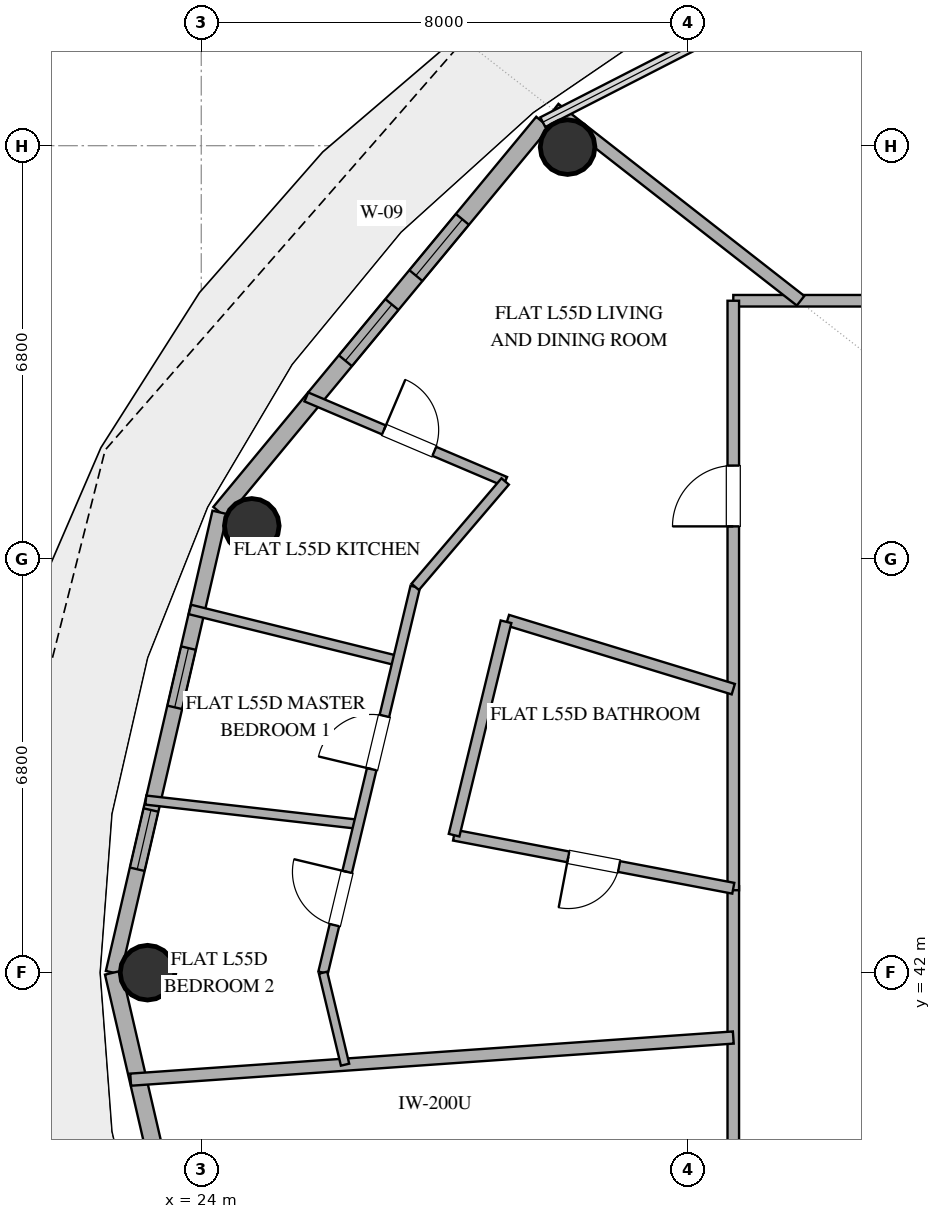
"""IFC4 building model, lengths in metres.
Left out: names, types, materials, properties, quantities, classifications, styles, units other than length and angle.
Written with IfcOpenShell. Run it as: python <this file> out.ifc"""

import sys

from ifc_helpers import new_model, si_unit, direction, frame, frame_2d, origin, origin_2d, place, context, subcontext, project, spatial, rectangle, hollow_circle, extrude, element, fill, save


model = new_model("IFC4")
c1 = context("Model", 3, precision=1e-05, world=origin(), true_north=direction((0.0, 1.0)))
c2 = subcontext(c1, "Body", "Model", "MODEL_VIEW")
j1 = project(units=[si_unit("LENGTHUNIT", "METRE"), si_unit("PLANEANGLEUNIT", "RADIAN")], contexts=[c1])
p1 = place(None, origin())
s1 = spatial("IfcSite", under=j1, at=p1, CompositionType="ELEMENT")
p2 = place(p1, origin())
s2 = spatial("IfcBuilding", under=s1, at=p2, CompositionType="ELEMENT")
p3 = place(p2, frame((0.0, 0.0, 217.2)))
s3 = spatial("IfcBuildingStorey", under=s2, at=p3, CompositionType="ELEMENT", Elevation=217.2)
for number, where, z_axis, x_axis in (
    (1, (30.025, 55.576, 0.0), (0.0, 0.0, 1.0), (1.0, 0.0, 0.0)),
    (2, (24.831, 49.347, 0.0), (0.0, 0.0, 1.0), (1.0, 0.0, 0.0)),
    (3, (23.117, 42.0, 0.0), (0.0, 0.0, 1.0), (1.0, 0.0, 0.0)),
):
    element("IfcColumn", number, at=place(p3, frame(where, z_axis=z_axis, x_axis=x_axis)), inside=s3, PredefinedType="COLUMN", context=c2, shape_type="SweptSolid", body=[
        extrude(hollow_circle(Radius=0.45, WallThickness=0.025, at=origin_2d()), origin(), (0.0, 0.0, 1.0), 3.36),
    ])
p4 = place(p3, frame((29.617, 55.987, 0.0), z_axis=(0.0, 0.0, 1.0), x_axis=(-0.63761509934, -0.770355103243, 0.0)))
e4 = element("IfcWall", 4, at=p4, inside=s3, PredefinedType="SOLIDWALL", context=c2, shape_type="SweptSolid", body=[
    extrude(rectangle(XDim=8.33, YDim=0.28, at=frame_2d((4.165, 0.0))), origin(), (0.0, 0.0, 1.0), 3.36),
])
p5 = place(p4, frame((2.074, 0.0, 0.85)))
e5 = element("IfcOpeningElement", 5, at=p5, cuts=e4, PredefinedType="OPENING", context=c2, shape_type="SweptSolid", body=[
    extrude(rectangle(XDim=1.2, YDim=1.8, at=frame_2d((0.6, 0.9))), frame((0.0, 0.15, 0.0), z_axis=(0.0, -1.0, 0.0), x_axis=(1.0, 0.0, 0.0)), (0.0, 0.0, 1.0), 0.3),
])
p6 = place(p4, frame((3.892, 0.0, 0.85)))
e6 = element("IfcOpeningElement", 6, at=p6, cuts=e4, PredefinedType="OPENING", context=c2, shape_type="SweptSolid", body=[
    extrude(rectangle(XDim=1.2, YDim=1.8, at=frame_2d((0.6, 0.9))), frame((0.0, 0.15, 0.0), z_axis=(0.0, -1.0, 0.0), x_axis=(1.0, 0.0, 0.0)), (0.0, 0.0, 1.0), 0.3),
])
p7 = place(p3, frame((24.306, 49.57, 0.0), z_axis=(0.0, 0.0, 1.0), x_axis=(-0.225635078214, -0.974211892495, 0.0)))
e7 = element("IfcWall", 7, at=p7, inside=s3, PredefinedType="SOLIDWALL", context=c2, shape_type="SweptSolid", body=[
    extrude(rectangle(XDim=7.77, YDim=0.25, at=frame_2d((3.885, 0.0))), origin(), (0.0, 0.0, 1.0), 3.36),
])
p8 = place(p7, frame((2.291, 0.0, 0.35)))
e8 = element("IfcOpeningElement", 8, at=p8, cuts=e7, PredefinedType="OPENING", context=c2, shape_type="SweptSolid", body=[
    extrude(rectangle(XDim=1.0, YDim=1.05, at=frame_2d((0.5, 0.525))), frame((0.0, 0.135, 0.0), z_axis=(0.0, -1.0, 0.0), x_axis=(1.0, 0.0, 0.0)), (0.0, 0.0, 1.0), 0.27),
])
p9 = place(p7, frame((5.024, 0.0, 1.42)))
e9 = element("IfcOpeningElement", 9, at=p9, cuts=e7, PredefinedType="OPENING", context=c2, shape_type="SweptSolid", body=[
    extrude(rectangle(XDim=1.0, YDim=1.05, at=frame_2d((0.5, 0.525))), frame((0.0, 0.135, 0.0), z_axis=(0.0, -1.0, 0.0), x_axis=(1.0, 0.0, 0.0)), (0.0, 0.0, 1.0), 0.27),
])
p10 = place(p3, frame((22.553, 42.0, 0.0), z_axis=(0.0, 0.0, 1.0), x_axis=(0.225635078214, -0.974211892495, 0.0)))
e10 = element("IfcWall", 10, at=p10, inside=s3, PredefinedType="SOLIDWALL", context=c2, shape_type="SweptSolid", body=[
    extrude(rectangle(XDim=7.77, YDim=0.28, at=frame_2d((3.885, 0.0))), origin(), (0.0, 0.0, 1.0), 3.36),
])
p11 = place(p10, frame((4.842, 0.0, 0.0)))
e11 = element("IfcOpeningElement", 11, at=p11, cuts=e10, PredefinedType="OPENING", context=c2, shape_type="SweptSolid", body=[
    extrude(rectangle(XDim=1.4, YDim=2.2, at=frame_2d((0.7, 1.1))), frame((0.0, 0.15, 0.0), z_axis=(0.0, -1.0, 0.0), x_axis=(1.0, 0.0, 0.0)), (0.0, 0.0, 1.0), 0.3),
])
p12 = place(p3, frame((32.75, 53.05, 0.0), z_axis=(0.0, 0.0, 1.0), x_axis=(1.0, 0.0, 0.0)))
e12 = element("IfcWall", 12, at=p12, inside=s3, PredefinedType="PARTITIONING", context=c2, shape_type="SweptSolid", body=[
    extrude(rectangle(XDim=16.055, YDim=0.19, at=frame_2d((8.027, 0.0))), origin(), (0.0, 0.0, 1.0), 2.72),
])
p13 = place(p12, frame((5.874, 0.0, 0.0)))
e13 = element("IfcOpeningElement", 13, at=p13, cuts=e12, PredefinedType="OPENING", context=c2, shape_type="SweptSolid", body=[
    extrude(rectangle(XDim=1.0, YDim=2.2, at=frame_2d((0.5, 1.1))), frame((0.0, 0.105, 0.0), z_axis=(0.0, -1.0, 0.0), x_axis=(1.0, 0.0, 0.0)), (0.0, 0.0, 1.0), 0.21),
])
p14 = place(p3, frame((32.75, 30.95, 0.0), z_axis=(0.0, 0.0, 1.0), x_axis=(0.0, 1.0, 0.0)))
e14 = element("IfcWall", 14, at=p14, inside=s3, PredefinedType="PARTITIONING", context=c2, shape_type="SweptSolid", body=[
    extrude(rectangle(XDim=12.471, YDim=0.19, at=frame_2d((6.236, 0.0))), origin(), (0.0, 0.0, 1.0), 2.72),
])
p15 = place(p14, frame((4.508, 0.0, 0.0)))
e15 = element("IfcOpeningElement", 15, at=p15, cuts=e14, PredefinedType="OPENING", context=c2, shape_type="SweptSolid", body=[
    extrude(rectangle(XDim=1.0, YDim=2.2, at=frame_2d((0.5, 1.1))), frame((0.0, 0.105, 0.0), z_axis=(0.0, -1.0, 0.0), x_axis=(1.0, 0.0, 0.0)), (0.0, 0.0, 1.0), 0.21),
])
p16 = place(p3, frame((32.75, 43.356, 0.0), z_axis=(0.0, 0.0, 1.0), x_axis=(0.0, 1.0, 0.0)))
e16 = element("IfcWall", 16, at=p16, inside=s3, PredefinedType="PARTITIONING", context=c2, shape_type="SweptSolid", body=[
    extrude(rectangle(XDim=9.694, YDim=0.19, at=frame_2d((4.847, 0.0))), origin(), (0.0, 0.0, 1.0), 2.72),
])
p17 = place(p16, frame((5.983, 0.0, 0.0)))
e17 = element("IfcOpeningElement", 17, at=p17, cuts=e16, PredefinedType="OPENING", context=c2, shape_type="SweptSolid", body=[
    extrude(rectangle(XDim=1.0, YDim=2.2, at=frame_2d((0.5, 1.1))), frame((0.0, 0.105, 0.0), z_axis=(0.0, -1.0, 0.0), x_axis=(1.0, 0.0, 0.0)), (0.0, 0.0, 1.0), 0.21),
])
p18 = place(p3, frame((32.75, 40.934, 0.0), z_axis=(0.0, 0.0, 1.0), x_axis=(-0.997563620801, -0.069762615023, 0.0)))
e18 = element("IfcWall", 18, at=p18, inside=s3, PredefinedType="PARTITIONING", context=c2, shape_type="SweptSolid", body=[
    extrude(rectangle(XDim=9.935, YDim=0.2, at=frame_2d((4.968, 0.0))), origin(), (0.0, 0.0, 1.0), 2.72),
])
p19 = place(p3, frame((29.813, 56.209, 0.0), z_axis=(0.0, 0.0, 1.0), x_axis=(0.788043849094, -0.615619112687, 0.0)))
e19 = element("IfcWall", 19, at=p19, inside=s3, PredefinedType="PARTITIONING", context=c2, shape_type="SweptSolid", body=[
    extrude(rectangle(XDim=5.131, YDim=0.2, at=frame_2d((2.566, 0.0))), origin(), (0.0, 0.0, 1.0), 2.72),
])
p20 = place(p3, frame((32.75, 43.389, 0.0), z_axis=(0.0, 0.0, 1.0), x_axis=(-0.982412093784, 0.186725675755, 0.0)))
e20 = element("IfcWall", 20, at=p20, inside=s3, PredefinedType="PLUMBINGWALL", context=c2, shape_type="SweptSolid", body=[
    extrude(rectangle(XDim=4.674, YDim=0.18, at=frame_2d((2.337, 0.0))), origin(), (0.0, 0.0, 1.0), 2.72),
])
p21 = place(p20, frame((1.912, 0.0, 0.0)))
e21 = element("IfcOpeningElement", 21, at=p21, cuts=e20, PredefinedType="OPENING", context=c2, shape_type="SweptSolid", body=[
    extrude(rectangle(XDim=0.85, YDim=2.1, at=frame_2d((0.425, 1.05))), frame((0.0, 0.1, 0.0), z_axis=(0.0, -1.0, 0.0), x_axis=(1.0, 0.0, 0.0)), (0.0, 0.0, 1.0), 0.2),
])
p22 = place(p3, frame((29.036, 47.798, 0.0), z_axis=(0.0, 0.0, 1.0), x_axis=(0.956306177074, -0.292367056437, 0.0)))
e22 = element("IfcWall", 22, at=p22, inside=s3, PredefinedType="PLUMBINGWALL", context=c2, shape_type="SweptSolid", body=[
    extrude(rectangle(XDim=3.884, YDim=0.18, at=frame_2d((1.942, 0.0))), origin(), (0.0, 0.0, 1.0), 2.72),
])
p23 = place(p3, frame((28.158, 44.261, 0.0), z_axis=(0.0, 0.0, 1.0), x_axis=(0.236567164095, 0.971615138248, 0.0)))
e23 = element("IfcWall", 23, at=p23, inside=s3, PredefinedType="PLUMBINGWALL", context=c2, shape_type="SweptSolid", body=[
    extrude(rectangle(XDim=3.612, YDim=0.18, at=frame_2d((1.806, 0.0))), origin(), (0.0, 0.0, 1.0), 2.72),
])
p24 = place(p3, frame((25.729, 51.468, 0.0), z_axis=(0.0, 0.0, 1.0), x_axis=(0.920292576495, -0.39123084445, 0.0)))
e24 = element("IfcWall", 24, at=p24, inside=s3, PredefinedType="PLUMBINGWALL", context=c2, shape_type="SweptSolid", body=[
    extrude(rectangle(XDim=3.553, YDim=0.16, at=frame_2d((1.777, 0.0))), origin(), (0.0, 0.0, 1.0), 2.72),
])
p25 = place(p24, frame((1.387, 0.0, 0.0)))
e25 = element("IfcOpeningElement", 25, at=p25, cuts=e24, PredefinedType="OPENING", context=c2, shape_type="SweptSolid", body=[
    extrude(rectangle(XDim=0.9, YDim=2.1, at=frame_2d((0.45, 1.05))), frame((0.0, 0.09, 0.0), z_axis=(0.0, -1.0, 0.0), x_axis=(1.0, 0.0, 0.0)), (0.0, 0.0, 1.0), 0.18),
])
p26 = place(p3, frame((23.088, 44.838, 0.0), z_axis=(0.0, 0.0, 1.0), x_axis=(0.99356860566, -0.113231735156, 0.0)))
e26 = element("IfcWall", 26, at=p26, inside=s3, PredefinedType="PARTITIONING", context=c2, shape_type="SweptSolid", body=[
    extrude(rectangle(XDim=3.521, YDim=0.15, at=frame_2d((1.76, 0.0))), origin(), (0.0, 0.0, 1.0), 2.72),
])
p27 = place(p3, frame((27.229, 47.13, 0.0), z_axis=(0.0, 0.0, 1.0), x_axis=(-0.970832476512, 0.239758842484, 0.0)))
e27 = element("IfcWall", 27, at=p27, inside=s3, PredefinedType="PLUMBINGWALL", context=c2, shape_type="SweptSolid", body=[
    extrude(rectangle(XDim=3.518, YDim=0.16, at=frame_2d((1.759, 0.0))), origin(), (0.0, 0.0, 1.0), 2.72),
])
p28 = place(p3, frame((26.004, 42.0, 0.0), z_axis=(0.0, 0.0, 1.0), x_axis=(0.232298462197, 0.972644551962, 0.0)))
e28 = element("IfcWall", 28, at=p28, inside=s3, PredefinedType="PLUMBINGWALL", context=c2, shape_type="SweptSolid", body=[
    extrude(rectangle(XDim=6.523, YDim=0.16, at=frame_2d((3.262, 0.0))), origin(), (0.0, 0.0, 1.0), 2.72),
])
p29 = place(p28, frame((3.441, 0.0, 0.0)))
e29 = element("IfcOpeningElement", 29, at=p29, cuts=e28, PredefinedType="OPENING", context=c2, shape_type="SweptSolid", body=[
    extrude(rectangle(XDim=0.9, YDim=2.1, at=frame_2d((0.45, 1.05))), frame((0.0, 0.09, 0.0), z_axis=(0.0, -1.0, 0.0), x_axis=(1.0, 0.0, 0.0)), (0.0, 0.0, 1.0), 0.18),
])
p30 = place(p28, frame((0.804, 0.0, 0.0)))
e30 = element("IfcOpeningElement", 30, at=p30, cuts=e28, PredefinedType="OPENING", context=c2, shape_type="SweptSolid", body=[
    extrude(rectangle(XDim=0.9, YDim=2.1, at=frame_2d((0.45, 1.05))), frame((0.0, 0.09, 0.0), z_axis=(0.0, -1.0, 0.0), x_axis=(1.0, 0.0, 0.0)), (0.0, 0.0, 1.0), 0.18),
])
p31 = place(p3, frame((28.999, 50.078, 0.0), z_axis=(0.0, 0.0, 1.0), x_axis=(-0.649254822002, -0.760570954025, 0.0)))
e31 = element("IfcWall", 31, at=p31, inside=s3, PredefinedType="PLUMBINGWALL", context=c2, shape_type="SweptSolid", body=[
    extrude(rectangle(XDim=2.279, YDim=0.16, at=frame_2d((1.139, 0.0))), origin(), (0.0, 0.0, 1.0), 2.72),
])
p32 = place(p3, frame((26.004, 42.0, 0.0), z_axis=(0.0, 0.0, 1.0), x_axis=(0.232292411737, -0.972645996984, 0.0)))
e32 = element("IfcWall", 32, at=p32, inside=s3, PredefinedType="PARTITIONING", context=c2, shape_type="SweptSolid", body=[
    extrude(rectangle(XDim=1.555, YDim=0.14, at=frame_2d((0.778, 0.0))), origin(), (0.0, 0.0, 1.0), 2.72),
])
p33 = place(p5, origin())
e33 = element("IfcWindow", 33, at=p33, inside=s3, PartitioningType="SINGLE_PANEL", PredefinedType="WINDOW", context=c2, shape_type="SweptSolid", body=[
    extrude(rectangle(XDim=1.2, YDim=1.8, at=frame_2d((0.6, 0.9))), frame((0.0, 0.03, 0.0), z_axis=(0.0, -1.0, 0.0), x_axis=(1.0, 0.0, 0.0)), (0.0, 0.0, 1.0), 0.06),
])
fill(e5, e33)
p34 = place(p6, origin())
e34 = element("IfcWindow", 34, at=p34, inside=s3, PartitioningType="SINGLE_PANEL", PredefinedType="WINDOW", context=c2, shape_type="SweptSolid", body=[
    extrude(rectangle(XDim=1.2, YDim=1.8, at=frame_2d((0.6, 0.9))), frame((0.0, 0.03, 0.0), z_axis=(0.0, -1.0, 0.0), x_axis=(1.0, 0.0, 0.0)), (0.0, 0.0, 1.0), 0.06),
])
fill(e6, e34)
p35 = place(p8, origin())
e35 = element("IfcWindow", 35, at=p35, inside=s3, PartitioningType="SINGLE_PANEL", PredefinedType="WINDOW", context=c2, shape_type="SweptSolid", body=[
    extrude(rectangle(XDim=1.0, YDim=1.05, at=frame_2d((0.5, 0.525))), frame((0.0, 0.03, 0.0), z_axis=(0.0, -1.0, 0.0), x_axis=(1.0, 0.0, 0.0)), (0.0, 0.0, 1.0), 0.06),
])
fill(e8, e35)
p36 = place(p9, origin())
e36 = element("IfcWindow", 36, at=p36, inside=s3, PartitioningType="SINGLE_PANEL", PredefinedType="WINDOW", context=c2, shape_type="SweptSolid", body=[
    extrude(rectangle(XDim=1.0, YDim=1.05, at=frame_2d((0.5, 0.525))), frame((0.0, 0.03, 0.0), z_axis=(0.0, -1.0, 0.0), x_axis=(1.0, 0.0, 0.0)), (0.0, 0.0, 1.0), 0.06),
])
fill(e9, e36)
p37 = place(p17, origin())
e37 = element("IfcDoor", 37, at=p37, inside=s3, OperationType="SINGLE_SWING_LEFT", PredefinedType="DOOR", context=c2, shape_type="SweptSolid", body=[
    extrude(rectangle(XDim=1.0, YDim=2.2, at=frame_2d((0.5, 1.1))), frame((0.0, 0.025, 0.0), z_axis=(0.0, -1.0, 0.0), x_axis=(1.0, 0.0, 0.0)), (0.0, 0.0, 1.0), 0.05),
])
fill(e17, e37)
p38 = place(p21, origin())
e38 = element("IfcDoor", 38, at=p38, inside=s3, OperationType="SINGLE_SWING_RIGHT", PredefinedType="DOOR", context=c2, shape_type="SweptSolid", body=[
    extrude(rectangle(XDim=0.85, YDim=2.1, at=frame_2d((0.425, 1.05))), frame((0.0, 0.025, 0.0), z_axis=(0.0, -1.0, 0.0), x_axis=(1.0, 0.0, 0.0)), (0.0, 0.0, 1.0), 0.05),
])
fill(e21, e38)
p39 = place(p25, origin())
e39 = element("IfcDoor", 39, at=p39, inside=s3, OperationType="SINGLE_SWING_LEFT", PredefinedType="DOOR", context=c2, shape_type="SweptSolid", body=[
    extrude(rectangle(XDim=0.9, YDim=2.1, at=frame_2d((0.45, 1.05))), frame((0.0, 0.025, 0.0), z_axis=(0.0, -1.0, 0.0), x_axis=(1.0, 0.0, 0.0)), (0.0, 0.0, 1.0), 0.05),
])
fill(e25, e39)
p40 = place(p29, origin())
e40 = element("IfcDoor", 40, at=p40, inside=s3, OperationType="SINGLE_SWING_LEFT", PredefinedType="DOOR", context=c2, shape_type="SweptSolid", body=[
    extrude(rectangle(XDim=0.9, YDim=2.1, at=frame_2d((0.45, 1.05))), frame((0.0, 0.025, 0.0), z_axis=(0.0, -1.0, 0.0), x_axis=(1.0, 0.0, 0.0)), (0.0, 0.0, 1.0), 0.05),
])
fill(e29, e40)
p41 = place(p30, origin())
e41 = element("IfcDoor", 41, at=p41, inside=s3, OperationType="SINGLE_SWING_RIGHT", PredefinedType="DOOR", context=c2, shape_type="SweptSolid", body=[
    extrude(rectangle(XDim=0.9, YDim=2.1, at=frame_2d((0.45, 1.05))), frame((0.0, 0.025, 0.0), z_axis=(0.0, -1.0, 0.0), x_axis=(1.0, 0.0, 0.0)), (0.0, 0.0, 1.0), 0.05),
])
fill(e30, e41)
save(model, sys.argv[1])
